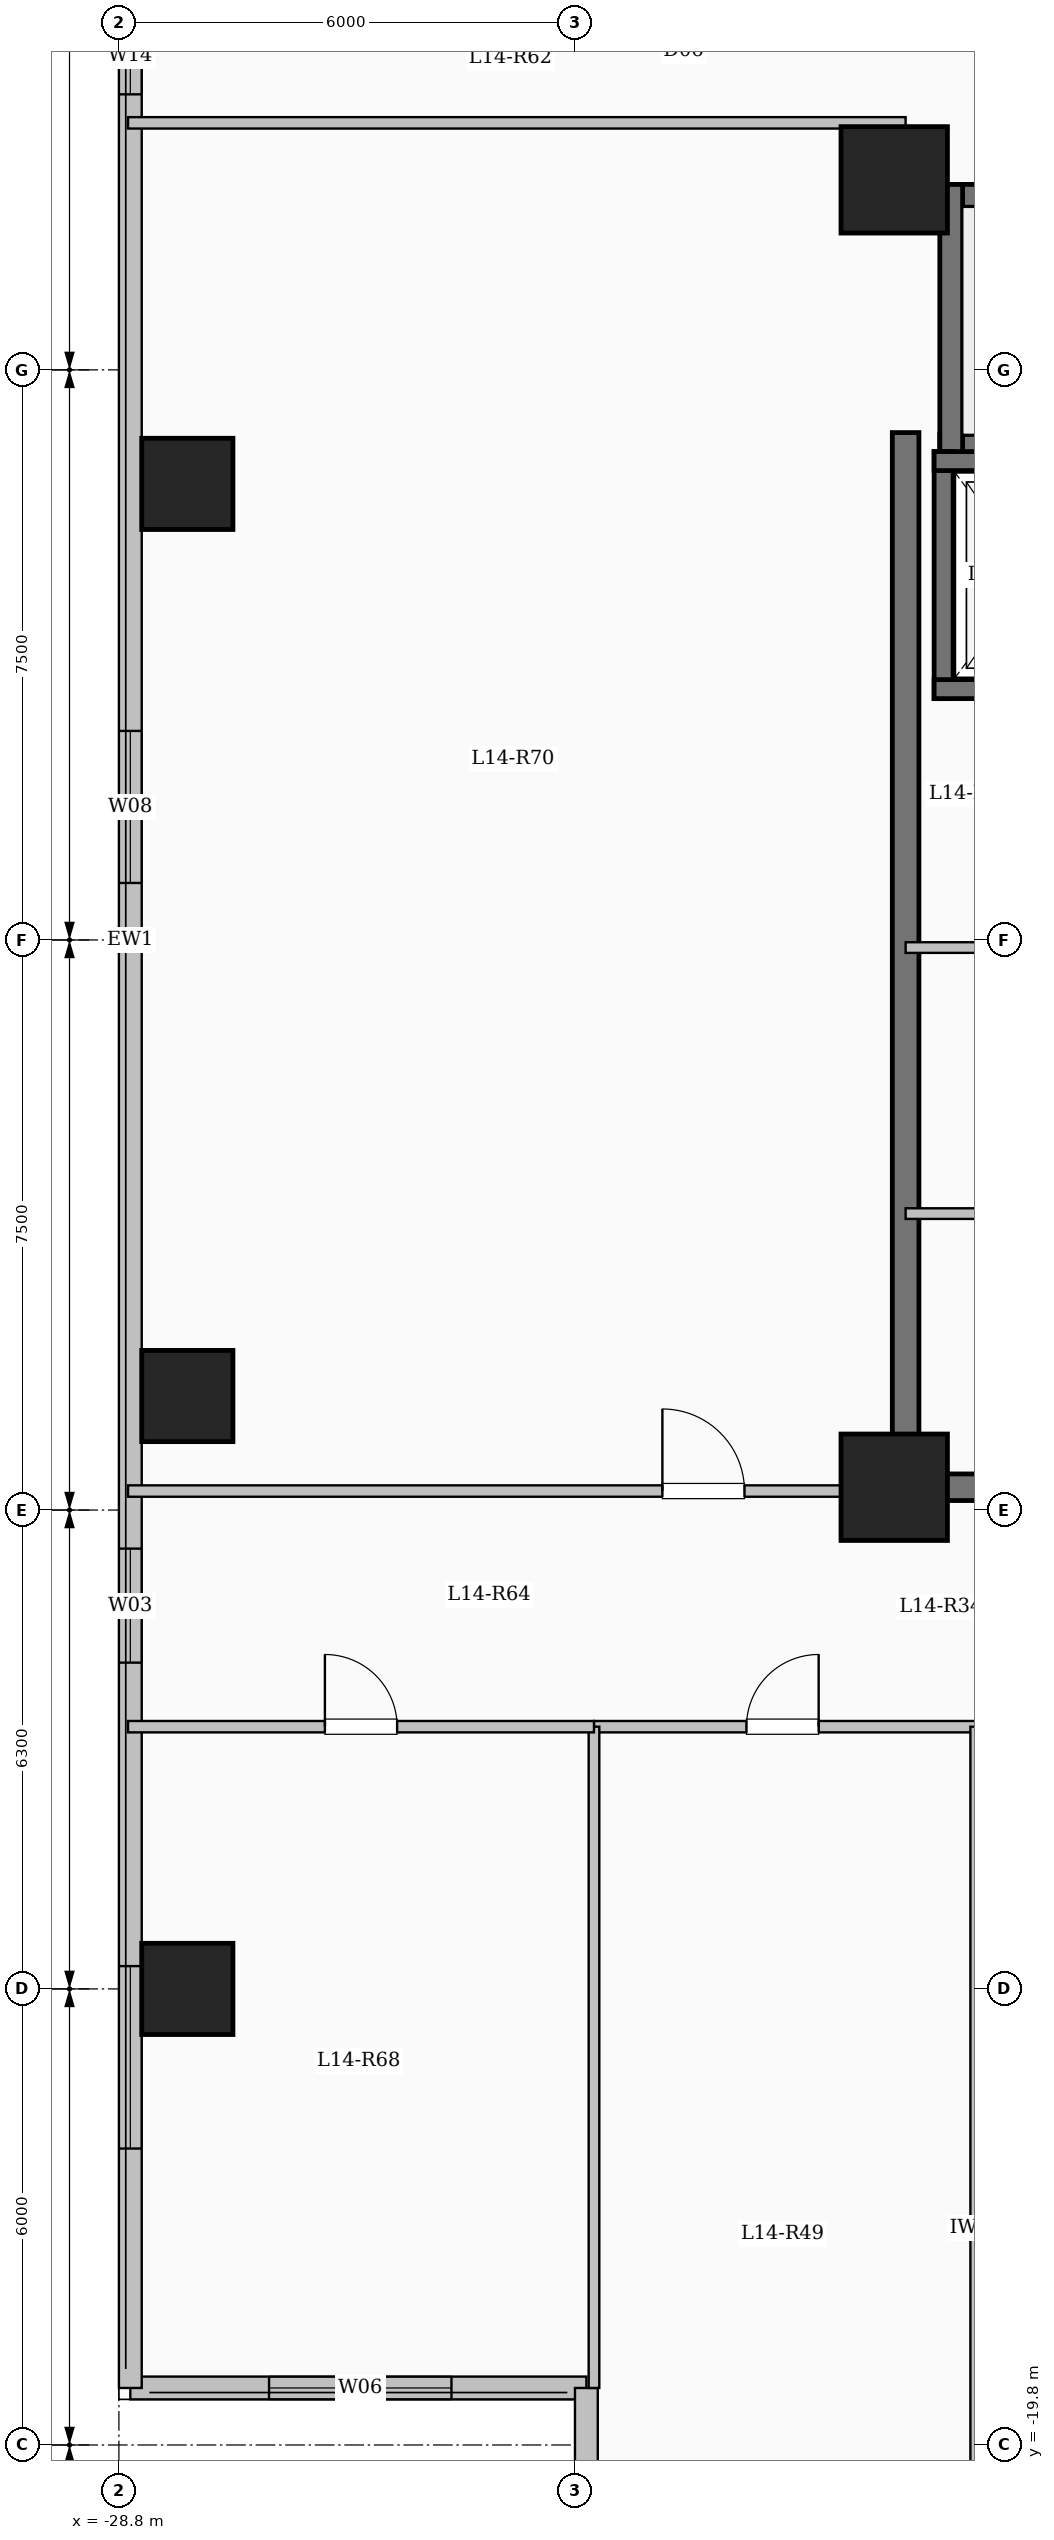
"""IFC4 building model, lengths in metres.
Left out: names, types, materials, properties, quantities, classifications, styles, units other than length and angle.
Written with IfcOpenShell. Run it as: python <this file> out.ifc"""

import sys

from ifc_helpers import new_model, si_unit, direction, frame, frame_2d, origin, origin_2d, place, context, subcontext, project, spatial, rectangle, extrude, element, fill, save


model = new_model("IFC4")
c1 = context("Model", 3, precision=1e-05, world=origin(), true_north=direction((0.0, 1.0)))
c2 = subcontext(c1, "Body", "Model", "MODEL_VIEW")
j1 = project(units=[si_unit("LENGTHUNIT", "METRE"), si_unit("PLANEANGLEUNIT", "RADIAN")], contexts=[c1])
p1 = place(None, origin())
s1 = spatial("IfcSite", under=j1, at=p1, CompositionType="ELEMENT")
p2 = place(p1, origin())
s2 = spatial("IfcBuilding", under=s1, at=p2, CompositionType="ELEMENT")
p3 = place(p2, frame((0.0, 0.0, 54.15)))
s3 = spatial("IfcBuildingStorey", under=s2, at=p3, CompositionType="ELEMENT", Elevation=54.15)
for number, where, z_axis, x_axis in (
    (1, (-18.6, -7.2, 0.0), (0.0, 0.0, 1.0), (1.0, 0.0, 0.0)),
    (2, (-18.6, 10.0, 0.0), (0.0, 0.0, 1.0), (1.0, 0.0, 0.0)),
):
    element("IfcColumn", number, at=place(p3, frame(where, z_axis=z_axis, x_axis=x_axis)), inside=s3, PredefinedType="COLUMN", context=c2, shape_type="SweptSolid", body=[
        extrude(rectangle(XDim=1.4, YDim=1.4, at=origin_2d()), origin(), (0.0, 0.0, 1.0), 3.35),
    ])
for number, where, z_axis, x_axis in (
    (3, (-27.9, -13.8, 0.0), (0.0, 0.0, 1.0), (1.0, 0.0, 0.0)),
    (4, (-27.9, -6.0, 0.0), (0.0, 0.0, 1.0), (1.0, 0.0, 0.0)),
    (5, (-27.9, 6.0, 0.0), (0.0, 0.0, 1.0), (1.0, 0.0, 0.0)),
):
    element("IfcColumn", number, at=place(p3, frame(where, z_axis=z_axis, x_axis=x_axis)), inside=s3, PredefinedType="COLUMN", context=c2, shape_type="SweptSolid", body=[
        extrude(rectangle(XDim=1.2, YDim=1.2, at=origin_2d()), origin(), (0.0, 0.0, 1.0), 3.35),
    ])
p4 = place(p3, frame((-22.65, -19.05, 0.0), z_axis=(0.0, 0.0, 1.0), x_axis=(-1.0, 0.0, 0.0)))
e6 = element("IfcWall", 6, at=p4, inside=s3, PredefinedType="SOLIDWALL", context=c2, shape_type="SweptSolid", body=[
    extrude(rectangle(XDim=6.0, YDim=0.3, at=frame_2d((3.0, 0.0))), origin(), (0.0, 0.0, 1.0), 3.1),
])
p5 = place(p4, frame((1.775, 0.0, 0.9)))
e7 = element("IfcOpeningElement", 7, at=p5, cuts=e6, PredefinedType="OPENING", context=c2, shape_type="SweptSolid", body=[
    extrude(rectangle(XDim=2.4, YDim=1.8, at=frame_2d((1.2, 0.9))), frame((0.0, 0.16, 0.0), z_axis=(0.0, -1.0, 0.0), x_axis=(1.0, 0.0, 0.0)), (0.0, 0.0, 1.0), 0.32),
])
p6 = place(p3, frame((-28.65, -19.05, 0.0), z_axis=(0.0, 0.0, 1.0), x_axis=(0.0, 1.0, 0.0)))
e8 = element("IfcWall", 8, at=p6, inside=s3, PredefinedType="SOLIDWALL", context=c2, shape_type="SweptSolid", body=[
    extrude(rectangle(XDim=38.1, YDim=0.3, at=frame_2d((19.05, 0.0))), origin(), (0.0, 0.0, 1.0), 3.1),
])
p7 = place(p6, frame((3.15, 0.0, 0.9)))
e9 = element("IfcOpeningElement", 9, at=p7, cuts=e8, PredefinedType="OPENING", context=c2, shape_type="SweptSolid", body=[
    extrude(rectangle(XDim=2.4, YDim=1.8, at=frame_2d((1.2, 0.9))), frame((0.0, 0.16, 0.0), z_axis=(0.0, -1.0, 0.0), x_axis=(1.0, 0.0, 0.0)), (0.0, 0.0, 1.0), 0.32),
])
p8 = place(p6, frame((9.542, 0.0, 0.9)))
e10 = element("IfcOpeningElement", 10, at=p8, cuts=e8, PredefinedType="OPENING", context=c2, shape_type="SweptSolid", body=[
    extrude(rectangle(XDim=1.5, YDim=1.65, at=frame_2d((0.75, 0.825))), frame((0.0, 0.16, 0.0), z_axis=(0.0, -1.0, 0.0), x_axis=(1.0, 0.0, 0.0)), (0.0, 0.0, 1.0), 0.32),
])
p9 = place(p6, frame((19.8, 0.0, 0.9)))
e11 = element("IfcOpeningElement", 11, at=p9, cuts=e8, PredefinedType="OPENING", context=c2, shape_type="SweptSolid", body=[
    extrude(rectangle(XDim=2.0, YDim=1.7, at=frame_2d((1.0, 0.85))), frame((0.0, 0.16, 0.0), z_axis=(0.0, -1.0, 0.0), x_axis=(1.0, 0.0, 0.0)), (0.0, 0.0, 1.0), 0.32),
])
p10 = place(p6, frame((30.175, 0.0, 0.95)))
e12 = element("IfcOpeningElement", 12, at=p10, cuts=e8, PredefinedType="OPENING", context=c2, shape_type="SweptSolid", body=[
    extrude(rectangle(XDim=1.0, YDim=1.5, at=frame_2d((0.5, 0.75))), frame((0.0, 0.16, 0.0), z_axis=(0.0, -1.0, 0.0), x_axis=(1.0, 0.0, 0.0)), (0.0, 0.0, 1.0), 0.32),
])
p11 = place(p6, frame((33.85, 0.0, 0.9)))
e13 = element("IfcOpeningElement", 13, at=p11, cuts=e8, PredefinedType="OPENING", context=c2, shape_type="SweptSolid", body=[
    extrude(rectangle(XDim=2.0, YDim=1.7, at=frame_2d((1.0, 0.85))), frame((0.0, 0.16, 0.0), z_axis=(0.0, -1.0, 0.0), x_axis=(1.0, 0.0, 0.0)), (0.0, 0.0, 1.0), 0.32),
])
p12 = place(p3, frame((-22.65, -23.55, 0.0), z_axis=(0.0, 0.0, 1.0), x_axis=(0.0, 1.0, 0.0)))
e14 = element("IfcWall", 14, at=p12, inside=s3, PredefinedType="SOLIDWALL", context=c2, shape_type="SweptSolid", body=[
    extrude(rectangle(XDim=4.5, YDim=0.3, at=frame_2d((2.25, 0.0))), origin(), (0.0, 0.0, 1.0), 3.1),
])
p13 = place(p12, frame((1.268, 0.0, 0.9)))
e15 = element("IfcOpeningElement", 15, at=p13, cuts=e14, PredefinedType="OPENING", context=c2, shape_type="SweptSolid", body=[
    extrude(rectangle(XDim=2.0, YDim=1.7, at=frame_2d((1.0, 0.85))), frame((0.0, 0.16, 0.0), z_axis=(0.0, -1.0, 0.0), x_axis=(1.0, 0.0, 0.0)), (0.0, 0.0, 1.0), 0.32),
])
p14 = place(p3, frame((-18.0, 9.79, 0.0), z_axis=(0.0, 0.0, 1.0), x_axis=(1.0, 0.0, 0.0)))
e16 = element("IfcWall", 16, at=p14, inside=s3, PredefinedType="SHEAR", context=c2, shape_type="SweptSolid", body=[
    extrude(rectangle(XDim=8.0, YDim=0.3, at=frame_2d((4.0, 0.0))), origin(), (0.0, 0.0, 1.0), 3.35),
])
p15 = place(p3, frame((-18.0, 6.5, 0.0), z_axis=(0.0, 0.0, 1.0), x_axis=(1.0, 0.0, 0.0)))
e17 = element("IfcWall", 17, at=p15, inside=s3, PredefinedType="SHEAR", context=c2, shape_type="SweptSolid", body=[
    extrude(rectangle(XDim=8.0, YDim=0.3, at=frame_2d((4.0, 0.0))), origin(), (0.0, 0.0, 1.0), 3.35),
])
p16 = place(p15, frame((6.45, 0.0, 0.0)))
e18 = element("IfcOpeningElement", 18, at=p16, cuts=e17, PredefinedType="OPENING", context=c2, shape_type="SweptSolid", body=[
    extrude(rectangle(XDim=1.0, YDim=2.15, at=frame_2d((0.5, 1.075))), frame((0.0, 0.16, 0.0), z_axis=(0.0, -1.0, 0.0), x_axis=(1.0, 0.0, 0.0)), (0.0, 0.0, 1.0), 0.32),
])
p17 = place(p3, frame((-17.85, 6.35, 0.0), z_axis=(0.0, 0.0, 1.0), x_axis=(0.0, 1.0, 0.0)))
e19 = element("IfcWall", 19, at=p17, inside=s3, PredefinedType="SHEAR", context=c2, shape_type="SweptSolid", body=[
    extrude(rectangle(XDim=3.59, YDim=0.3, at=frame_2d((1.795, 0.0))), origin(), (0.0, 0.0, 1.0), 3.35),
])
p18 = place(p3, frame((-17.95, 3.175, 0.0), z_axis=(0.0, 0.0, 1.0), x_axis=(0.0, 1.0, 0.0)))
e20 = element("IfcWall", 20, at=p18, inside=s3, PredefinedType="SHEAR", context=c2, shape_type="SweptSolid", body=[
    extrude(rectangle(XDim=3.25, YDim=0.25, at=frame_2d((1.625, 0.0))), origin(), (0.0, 0.0, 1.0), 3.35),
])
for number, where, z_axis, x_axis in (
    (21, (-18.075, 3.3, 0.0), (0.0, 0.0, 1.0), (1.0, 0.0, 0.0)),
    (22, (-18.075, 6.3, 0.0), (0.0, 0.0, 1.0), (1.0, 0.0, 0.0)),
):
    element("IfcWall", number, at=place(p3, frame(where, z_axis=z_axis, x_axis=x_axis)), inside=s3, PredefinedType="SHEAR", context=c2, shape_type="SweptSolid", body=[
        extrude(rectangle(XDim=2.55, YDim=0.25, at=frame_2d((1.275, 0.0))), origin(), (0.0, 0.0, 1.0), 3.35),
    ])
p19 = place(p3, frame((-18.45, -7.375, 0.0), z_axis=(0.0, 0.0, 1.0), x_axis=(0.0, 1.0, 0.0)))
e23 = element("IfcWall", 23, at=p19, inside=s3, PredefinedType="SHEAR", context=c2, shape_type="SweptSolid", body=[
    extrude(rectangle(XDim=14.05, YDim=0.35, at=frame_2d((7.025, 0.0))), origin(), (0.0, 0.0, 1.0), 3.35),
])
p20 = place(p3, frame((-18.625, -7.2, 0.0), z_axis=(0.0, 0.0, 1.0), x_axis=(1.0, 0.0, 0.0)))
e24 = element("IfcWall", 24, at=p20, inside=s3, PredefinedType="SHEAR", context=c2, shape_type="SweptSolid", body=[
    extrude(rectangle(XDim=8.55, YDim=0.35, at=frame_2d((4.275, 0.0))), origin(), (0.0, 0.0, 1.0), 3.35),
])
p21 = place(p3, frame((-18.45, -3.6, 0.0), z_axis=(0.0, 0.0, 1.0), x_axis=(1.0, 0.0, 0.0)))
e25 = element("IfcWall", 25, at=p21, inside=s3, PredefinedType="PARTITIONING", context=c2, shape_type="SweptSolid", body=[
    extrude(rectangle(XDim=3.05, YDim=0.14, at=frame_2d((1.525, 0.0))), origin(), (0.0, 0.0, 1.0), 3.1),
])
p22 = place(p21, frame((1.05, 0.0, 0.0)))
e26 = element("IfcOpeningElement", 26, at=p22, cuts=e25, PredefinedType="OPENING", context=c2, shape_type="SweptSolid", body=[
    extrude(rectangle(XDim=0.9, YDim=2.08, at=frame_2d((0.45, 1.04))), frame((0.0, 0.08, 0.0), z_axis=(0.0, -1.0, 0.0), x_axis=(1.0, 0.0, 0.0)), (0.0, 0.0, 1.0), 0.16),
])
p23 = place(p3, frame((-18.45, -0.1, 0.0), z_axis=(0.0, 0.0, 1.0), x_axis=(1.0, 0.0, 0.0)))
e27 = element("IfcWall", 27, at=p23, inside=s3, PredefinedType="PARTITIONING", context=c2, shape_type="SweptSolid", body=[
    extrude(rectangle(XDim=3.05, YDim=0.14, at=frame_2d((1.525, 0.0))), origin(), (0.0, 0.0, 1.0), 3.1),
])
p24 = place(p23, frame((1.05, 0.0, 0.0)))
e28 = element("IfcOpeningElement", 28, at=p24, cuts=e27, PredefinedType="OPENING", context=c2, shape_type="SweptSolid", body=[
    extrude(rectangle(XDim=0.9, YDim=2.08, at=frame_2d((0.45, 1.04))), frame((0.0, 0.08, 0.0), z_axis=(0.0, -1.0, 0.0), x_axis=(1.0, 0.0, 0.0)), (0.0, 0.0, 1.0), 0.16),
])
p25 = place(p3, frame((-22.55, -10.35, 0.0), z_axis=(0.0, 0.0, 1.0), x_axis=(1.0, 0.0, 0.0)))
e29 = element("IfcWall", 29, at=p25, inside=s3, PredefinedType="PARTITIONING", context=c2, shape_type="SweptSolid", body=[
    extrude(rectangle(XDim=14.0, YDim=0.15, at=frame_2d((7.0, 0.0))), origin(), (0.0, 0.0, 1.0), 3.1),
])
p26 = place(p25, frame((2.006, 0.0, 0.0)))
e30 = element("IfcOpeningElement", 30, at=p26, cuts=e29, PredefinedType="OPENING", context=c2, shape_type="SweptSolid", body=[
    extrude(rectangle(XDim=0.95, YDim=2.15, at=frame_2d((0.475, 1.075))), frame((0.0, 0.085, 0.0), z_axis=(0.0, -1.0, 0.0), x_axis=(1.0, 0.0, 0.0)), (0.0, 0.0, 1.0), 0.17),
])
p27 = place(p25, frame((7.058, 0.0, 0.0)))
e31 = element("IfcOpeningElement", 31, at=p27, cuts=e29, PredefinedType="OPENING", context=c2, shape_type="SweptSolid", body=[
    extrude(rectangle(XDim=0.95, YDim=2.15, at=frame_2d((0.475, 1.075))), frame((0.0, 0.085, 0.0), z_axis=(0.0, -1.0, 0.0), x_axis=(1.0, 0.0, 0.0)), (0.0, 0.0, 1.0), 0.17),
])
p28 = place(p25, frame((11.552, 0.0, 0.0)))
e32 = element("IfcOpeningElement", 32, at=p28, cuts=e29, PredefinedType="OPENING", context=c2, shape_type="SweptSolid", body=[
    extrude(rectangle(XDim=0.95, YDim=2.15, at=frame_2d((0.475, 1.075))), frame((0.0, 0.085, 0.0), z_axis=(0.0, -1.0, 0.0), x_axis=(1.0, 0.0, 0.0)), (0.0, 0.0, 1.0), 0.17),
])
p29 = place(p3, frame((-17.528, -23.55, 0.0), z_axis=(0.0, 0.0, 1.0), x_axis=(0.0, 1.0, 0.0)))
e33 = element("IfcWall", 33, at=p29, inside=s3, PredefinedType="PARTITIONING", context=c2, shape_type="SweptSolid", body=[
    extrude(rectangle(XDim=13.2, YDim=0.14, at=frame_2d((6.6, 0.0))), origin(), (0.0, 0.0, 1.0), 3.1),
])
p30 = place(p3, frame((-28.68, -7.25, 0.0), z_axis=(0.0, 0.0, 1.0), x_axis=(1.0, 0.0, 0.0)))
e34 = element("IfcWall", 34, at=p30, inside=s3, PredefinedType="PARTITIONING", context=c2, shape_type="SweptSolid", body=[
    extrude(rectangle(XDim=10.23, YDim=0.15, at=frame_2d((5.115, 0.0))), origin(), (0.0, 0.0, 1.0), 3.1),
])
p31 = place(p30, frame((7.03, 0.0, 0.0)))
e35 = element("IfcOpeningElement", 35, at=p31, cuts=e34, PredefinedType="OPENING", context=c2, shape_type="SweptSolid", body=[
    extrude(rectangle(XDim=1.08, YDim=2.15, at=frame_2d((0.54, 1.075))), frame((0.0, 0.085, 0.0), z_axis=(0.0, -1.0, 0.0), x_axis=(1.0, 0.0, 0.0)), (0.0, 0.0, 1.0), 0.17),
])
p32 = place(p3, frame((-28.68, 10.75, 0.0), z_axis=(0.0, 0.0, 1.0), x_axis=(1.0, 0.0, 0.0)))
e36 = element("IfcWall", 36, at=p32, inside=s3, PredefinedType="PARTITIONING", context=c2, shape_type="SweptSolid", body=[
    extrude(rectangle(XDim=10.23, YDim=0.15, at=frame_2d((5.115, 0.0))), origin(), (0.0, 0.0, 1.0), 3.1),
])
p33 = place(p3, frame((-22.55, -19.05, 0.0), z_axis=(0.0, 0.0, 1.0), x_axis=(0.0, 1.0, 0.0)))
e37 = element("IfcWall", 37, at=p33, inside=s3, PredefinedType="PARTITIONING", context=c2, shape_type="SweptSolid", body=[
    extrude(rectangle(XDim=8.7, YDim=0.14, at=frame_2d((4.35, 0.0))), origin(), (0.0, 0.0, 1.0), 3.1),
])
p34 = place(p3, frame((-28.68, -10.35, 0.0), z_axis=(0.0, 0.0, 1.0), x_axis=(1.0, 0.0, 0.0)))
e38 = element("IfcWall", 38, at=p34, inside=s3, PredefinedType="PARTITIONING", context=c2, shape_type="SweptSolid", body=[
    extrude(rectangle(XDim=6.13, YDim=0.15, at=frame_2d((3.065, 0.0))), origin(), (0.0, 0.0, 1.0), 3.1),
])
p35 = place(p34, frame((2.59, 0.0, 0.0)))
e39 = element("IfcOpeningElement", 39, at=p35, cuts=e38, PredefinedType="OPENING", context=c2, shape_type="SweptSolid", body=[
    extrude(rectangle(XDim=0.95, YDim=2.15, at=frame_2d((0.475, 1.075))), frame((0.0, 0.085, 0.0), z_axis=(0.0, -1.0, 0.0), x_axis=(1.0, 0.0, 0.0)), (0.0, 0.0, 1.0), 0.17),
])
p36 = place(p5, origin())
e40 = element("IfcWindow", 40, at=p36, inside=s3, PartitioningType="SINGLE_PANEL", PredefinedType="WINDOW", context=c2, shape_type="SweptSolid", body=[
    extrude(rectangle(XDim=2.4, YDim=1.8, at=frame_2d((1.2, 0.9))), frame((0.0, 0.03, 0.0), z_axis=(0.0, -1.0, 0.0), x_axis=(1.0, 0.0, 0.0)), (0.0, 0.0, 1.0), 0.06),
])
fill(e7, e40)
p37 = place(p7, origin())
e41 = element("IfcWindow", 41, at=p37, inside=s3, PartitioningType="SINGLE_PANEL", PredefinedType="WINDOW", context=c2, shape_type="SweptSolid", body=[
    extrude(rectangle(XDim=2.4, YDim=1.8, at=frame_2d((1.2, 0.9))), frame((0.0, 0.03, 0.0), z_axis=(0.0, -1.0, 0.0), x_axis=(1.0, 0.0, 0.0)), (0.0, 0.0, 1.0), 0.06),
])
fill(e9, e41)
p38 = place(p8, origin())
e42 = element("IfcWindow", 42, at=p38, inside=s3, PartitioningType="SINGLE_PANEL", PredefinedType="WINDOW", context=c2, shape_type="SweptSolid", body=[
    extrude(rectangle(XDim=1.5, YDim=1.65, at=frame_2d((0.75, 0.825))), frame((0.0, 0.03, 0.0), z_axis=(0.0, -1.0, 0.0), x_axis=(1.0, 0.0, 0.0)), (0.0, 0.0, 1.0), 0.06),
])
fill(e10, e42)
p39 = place(p9, origin())
e43 = element("IfcWindow", 43, at=p39, inside=s3, PartitioningType="SINGLE_PANEL", PredefinedType="WINDOW", context=c2, shape_type="SweptSolid", body=[
    extrude(rectangle(XDim=2.0, YDim=1.7, at=frame_2d((1.0, 0.85))), frame((0.0, 0.03, 0.0), z_axis=(0.0, -1.0, 0.0), x_axis=(1.0, 0.0, 0.0)), (0.0, 0.0, 1.0), 0.06),
])
fill(e11, e43)
p40 = place(p10, origin())
e44 = element("IfcWindow", 44, at=p40, inside=s3, PartitioningType="SINGLE_PANEL", PredefinedType="WINDOW", context=c2, shape_type="SweptSolid", body=[
    extrude(rectangle(XDim=1.0, YDim=1.5, at=frame_2d((0.5, 0.75))), frame((0.0, 0.03, 0.0), z_axis=(0.0, -1.0, 0.0), x_axis=(1.0, 0.0, 0.0)), (0.0, 0.0, 1.0), 0.06),
])
fill(e12, e44)
p41 = place(p26, origin())
e45 = element("IfcDoor", 45, at=p41, inside=s3, OperationType="SINGLE_SWING_RIGHT", PredefinedType="DOOR", context=c2, shape_type="SweptSolid", body=[
    extrude(rectangle(XDim=0.95, YDim=2.15, at=frame_2d((0.475, 1.075))), frame((0.0, 0.025, 0.0), z_axis=(0.0, -1.0, 0.0), x_axis=(1.0, 0.0, 0.0)), (0.0, 0.0, 1.0), 0.05),
])
fill(e30, e45)
p42 = place(p35, origin())
e46 = element("IfcDoor", 46, at=p42, inside=s3, OperationType="SINGLE_SWING_LEFT", PredefinedType="DOOR", context=c2, shape_type="SweptSolid", body=[
    extrude(rectangle(XDim=0.95, YDim=2.15, at=frame_2d((0.475, 1.075))), frame((0.0, 0.025, 0.0), z_axis=(0.0, -1.0, 0.0), x_axis=(1.0, 0.0, 0.0)), (0.0, 0.0, 1.0), 0.05),
])
fill(e39, e46)
p43 = place(p31, origin())
e47 = element("IfcDoor", 47, at=p43, inside=s3, OperationType="SINGLE_SWING_LEFT", PredefinedType="DOOR", context=c2, shape_type="SweptSolid", body=[
    extrude(rectangle(XDim=1.08, YDim=2.15, at=frame_2d((0.54, 1.075))), frame((0.0, 0.025, 0.0), z_axis=(0.0, -1.0, 0.0), x_axis=(1.0, 0.0, 0.0)), (0.0, 0.0, 1.0), 0.05),
])
fill(e35, e47)
save(model, sys.argv[1])
